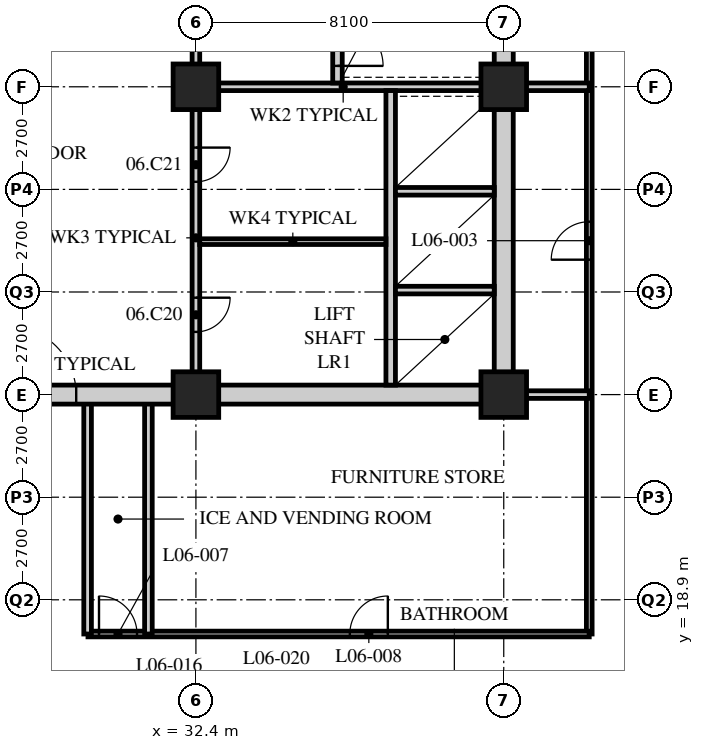
"""IFC4 building model, lengths in metres.
Left out: names, types, materials, properties, quantities, classifications, styles, units other than length and angle.
Written with IfcOpenShell. Run it as: python <this file> out.ifc"""

import sys

from ifc_helpers import new_model, si_unit, direction, frame, frame_2d, origin, origin_2d, place, context, subcontext, project, spatial, rectangle, hollow_rectangle, extrude, element, fill, save


model = new_model("IFC4")
c1 = context("Model", 3, precision=1e-05, world=origin(), true_north=direction((0.0, 1.0)))
c2 = subcontext(c1, "Body", "Model", "MODEL_VIEW")
j1 = project(units=[si_unit("LENGTHUNIT", "METRE"), si_unit("PLANEANGLEUNIT", "RADIAN")], contexts=[c1])
p1 = place(None, origin())
s1 = spatial("IfcSite", under=j1, at=p1, CompositionType="ELEMENT")
p2 = place(p1, origin())
s2 = spatial("IfcBuilding", under=s1, at=p2, CompositionType="ELEMENT")
p3 = place(p2, frame((0.0, 0.0, 33.0)))
s3 = spatial("IfcBuildingStorey", under=s2, at=p3, CompositionType="ELEMENT", Elevation=33.0)
for number, where, z_axis, x_axis in (
    (1, (32.4, 24.3, 0.0), (0.0, 0.0, 1.0), (1.0, 0.0, 0.0)),
    (2, (32.4, 32.4, 0.0), (0.0, 0.0, 1.0), (1.0, 0.0, 0.0)),
    (3, (40.5, 24.3, 0.0), (0.0, 0.0, 1.0), (1.0, 0.0, 0.0)),
    (4, (40.5, 32.4, 0.0), (0.0, 0.0, 1.0), (1.0, 0.0, 0.0)),
):
    element("IfcColumn", number, at=place(p3, frame(where, z_axis=z_axis, x_axis=x_axis)), inside=s3, PredefinedType="COLUMN", context=c2, shape_type="SweptSolid", body=[
        extrude(hollow_rectangle(XDim=1.2, YDim=1.2, WallThickness=0.12, at=origin_2d()), origin(), (0.0, 0.0, 1.0), 3.4),
    ])
p4 = place(p3, frame((42.75, 18.0, 0.0), z_axis=(0.0, 0.0, 1.0), x_axis=(0.0, 1.0, 0.0)))
e5 = element("IfcWall", 5, at=p4, inside=s3, PredefinedType="PARTITIONING", context=c2, shape_type="SweptSolid", body=[
    extrude(rectangle(XDim=22.5, YDim=0.15, at=frame_2d((11.25, 0.0))), origin(), (0.0, 0.0, 1.0), 3.19),
])
p5 = place(p4, frame((9.85, 0.0, 0.0)))
e6 = element("IfcOpeningElement", 6, at=p5, cuts=e5, PredefinedType="OPENING", context=c2, shape_type="SweptSolid", body=[
    extrude(rectangle(XDim=1.0, YDim=2.1, at=frame_2d((0.5, 1.05))), frame((0.0, 0.085, 0.0), z_axis=(0.0, -1.0, 0.0), x_axis=(1.0, 0.0, 0.0)), (0.0, 0.0, 1.0), 0.17),
])
p6 = place(p4, frame((17.95, 0.0, 0.0)))
e7 = element("IfcOpeningElement", 7, at=p6, cuts=e5, PredefinedType="OPENING", context=c2, shape_type="SweptSolid", body=[
    extrude(rectangle(XDim=1.0, YDim=2.1, at=frame_2d((0.5, 1.05))), frame((0.0, 0.085, 0.0), z_axis=(0.0, -1.0, 0.0), x_axis=(1.0, 0.0, 0.0)), (0.0, 0.0, 1.0), 0.17),
])
p7 = place(p3, frame((29.56, 18.0, 0.0), z_axis=(0.0, 0.0, 1.0), x_axis=(1.0, 0.0, 0.0)))
e8 = element("IfcWall", 8, at=p7, inside=s3, PredefinedType="PARTITIONING", context=c2, shape_type="SweptSolid", body=[
    extrude(rectangle(XDim=13.19, YDim=0.15, at=frame_2d((6.595, 0.0))), origin(), (0.0, 0.0, 1.0), 3.19),
])
p8 = place(p7, frame((0.29, 0.0, 0.0)))
e9 = element("IfcOpeningElement", 9, at=p8, cuts=e8, PredefinedType="OPENING", context=c2, shape_type="SweptSolid", body=[
    extrude(rectangle(XDim=1.0, YDim=2.1, at=frame_2d((0.5, 1.05))), frame((0.0, 0.085, 0.0), z_axis=(0.0, -1.0, 0.0), x_axis=(1.0, 0.0, 0.0)), (0.0, 0.0, 1.0), 0.17),
])
p9 = place(p7, frame((6.89, 0.0, 0.0)))
e10 = element("IfcOpeningElement", 10, at=p9, cuts=e8, PredefinedType="OPENING", context=c2, shape_type="SweptSolid", body=[
    extrude(rectangle(XDim=1.0, YDim=2.1, at=frame_2d((0.5, 1.05))), frame((0.0, 0.085, 0.0), z_axis=(0.0, -1.0, 0.0), x_axis=(1.0, 0.0, 0.0)), (0.0, 0.0, 1.0), 0.17),
])
p10 = place(p3, frame((40.5, 32.4, 0.0), z_axis=(0.0, 0.0, 1.0), x_axis=(1.0, 0.0, 0.0)))
e11 = element("IfcWall", 11, at=p10, inside=s3, PredefinedType="SOLIDWALL", context=c2, shape_type="SweptSolid", body=[
    extrude(rectangle(XDim=2.25, YDim=0.2, at=frame_2d((1.125, 0.0))), origin(), (0.0, 0.0, 1.0), 2.578),
])
for number, where, z_axis, x_axis in (
    (12, (31.15, 18.0, 0.0), (0.0, 0.0, 1.0), (0.0, 1.0, 0.0)),
    (13, (29.55, 18.0, 0.0), (0.0, 0.0, 1.0), (0.0, 1.0, 0.0)),
):
    element("IfcWall", number, at=place(p3, frame(where, z_axis=z_axis, x_axis=x_axis)), inside=s3, PredefinedType="SOLIDWALL", context=c2, shape_type="SweptSolid", body=[
        extrude(rectangle(XDim=6.3, YDim=0.2, at=frame_2d((3.15, 0.0))), origin(), (0.0, 0.0, 1.0), 3.19),
    ])
p11 = place(p3, frame((40.5, 24.3, 0.0), z_axis=(0.0, 0.0, 1.0), x_axis=(1.0, 0.0, 0.0)))
e14 = element("IfcWall", 14, at=p11, inside=s3, PredefinedType="SOLIDWALL", context=c2, shape_type="SweptSolid", body=[
    extrude(rectangle(XDim=2.25, YDim=0.2, at=frame_2d((1.125, 0.0))), origin(), (0.0, 0.0, 1.0), 2.578),
])
p12 = place(p3, frame((15.95, 24.3, 0.0), z_axis=(0.0, 0.0, 1.0), x_axis=(1.0, 0.0, 0.0)))
e15 = element("IfcWall", 15, at=p12, inside=s3, PredefinedType="SOLIDWALL", context=c2, shape_type="SweptSolid", body=[
    extrude(rectangle(XDim=24.8, YDim=0.5, at=frame_2d((12.4, 0.0))), origin(), (0.0, 0.0, 1.0), 2.54),
])
p13 = place(p12, frame((11.5, 0.0, 0.0)))
e16 = element("IfcOpeningElement", 16, at=p13, cuts=e15, PredefinedType="OPENING", context=c2, shape_type="SweptSolid", body=[
    extrude(rectangle(XDim=1.8, YDim=2.4, at=frame_2d((0.9, 1.2))), frame((0.0, 0.26, 0.0), z_axis=(0.0, -1.0, 0.0), x_axis=(1.0, 0.0, 0.0)), (0.0, 0.0, 1.0), 0.52),
])
p14 = place(p3, frame((40.5, 24.55, 0.0), z_axis=(0.0, 0.0, 1.0), x_axis=(0.0, 1.0, 0.0)))
e17 = element("IfcWall", 17, at=p14, inside=s3, PredefinedType="SOLIDWALL", context=c2, shape_type="SweptSolid", body=[
    extrude(rectangle(XDim=15.7, YDim=0.5, at=frame_2d((7.85, 0.0))), origin(), (0.0, 0.0, 1.0), 2.578),
])
p15 = place(p3, frame((32.3, 32.4, 0.0), z_axis=(0.0, 0.0, 1.0), x_axis=(1.0, 0.0, 0.0)))
e18 = element("IfcWall", 18, at=p15, inside=s3, PredefinedType="SOLIDWALL", context=c2, shape_type="SweptSolid", body=[
    extrude(rectangle(XDim=7.95, YDim=0.2, at=frame_2d((3.975, 0.0))), origin(), (0.0, 0.0, 1.0), 2.578),
])
p16 = place(p3, frame((32.4, 32.5, 0.0), z_axis=(0.0, 0.0, 1.0), x_axis=(0.0, 1.0, 0.0)))
e19 = element("IfcWall", 19, at=p16, inside=s3, PredefinedType="SOLIDWALL", context=c2, shape_type="SweptSolid", body=[
    extrude(rectangle(XDim=7.75, YDim=0.2, at=frame_2d((3.875, 0.0))), origin(), (0.0, 0.0, 1.0), 2.578),
])
p17 = place(p16, frame((1.9, 0.0, 0.0)))
e20 = element("IfcOpeningElement", 20, at=p17, cuts=e19, PredefinedType="OPENING", context=c2, shape_type="SweptSolid", body=[
    extrude(rectangle(XDim=1.2, YDim=2.1, at=frame_2d((0.6, 1.05))), frame((0.0, 0.11, 0.0), z_axis=(0.0, -1.0, 0.0), x_axis=(1.0, 0.0, 0.0)), (0.0, 0.0, 1.0), 0.22),
])
p18 = place(p3, frame((37.525, 24.55, 0.0), z_axis=(0.0, 0.0, 1.0), x_axis=(0.0, 1.0, 0.0)))
e21 = element("IfcWall", 21, at=p18, inside=s3, PredefinedType="SOLIDWALL", context=c2, shape_type="SweptSolid", body=[
    extrude(rectangle(XDim=7.75, YDim=0.25, at=frame_2d((3.875, 0.0))), origin(), (0.0, 0.0, 1.0), 3.19),
])
for number, where, z_axis, x_axis in (
    (22, (37.65, 27.05, 0.0), (0.0, 0.0, 1.0), (1.0, 0.0, 0.0)),
    (23, (37.65, 29.65, 0.0), (0.0, 0.0, 1.0), (1.0, 0.0, 0.0)),
):
    element("IfcWall", number, at=place(p3, frame(where, z_axis=z_axis, x_axis=x_axis)), inside=s3, PredefinedType="SOLIDWALL", context=c2, shape_type="SweptSolid", body=[
        extrude(rectangle(XDim=2.6, YDim=0.2, at=frame_2d((1.3, 0.0))), origin(), (0.0, 0.0, 1.0), 3.19),
    ])
p19 = place(p3, frame((36.125, 32.5, 0.0), z_axis=(0.0, 0.0, 1.0), x_axis=(0.0, 1.0, 0.0)))
e24 = element("IfcWall", 24, at=p19, inside=s3, PredefinedType="SOLIDWALL", context=c2, shape_type="SweptSolid", body=[
    extrude(rectangle(XDim=7.75, YDim=0.25, at=frame_2d((3.875, 0.0))), origin(), (0.0, 0.0, 1.0), 3.19),
])
p20 = place(p19, frame((0.45, 0.0, 0.0)))
e25 = element("IfcOpeningElement", 25, at=p20, cuts=e24, PredefinedType="OPENING", context=c2, shape_type="SweptSolid", body=[
    extrude(rectangle(XDim=1.2, YDim=2.1, at=frame_2d((0.6, 1.05))), frame((0.0, 0.135, 0.0), z_axis=(0.0, -1.0, 0.0), x_axis=(1.0, 0.0, 0.0)), (0.0, 0.0, 1.0), 0.27),
])
p21 = place(p3, frame((32.4, 24.55, 0.0), z_axis=(0.0, 0.0, 1.0), x_axis=(0.0, 1.0, 0.0)))
e26 = element("IfcWall", 26, at=p21, inside=s3, PredefinedType="PARTITIONING", context=c2, shape_type="SweptSolid", body=[
    extrude(rectangle(XDim=7.75, YDim=0.2, at=frame_2d((3.875, 0.0))), origin(), (0.0, 0.0, 1.0), 2.578),
])
p22 = place(p21, frame((1.4, 0.0, 0.0)))
e27 = element("IfcOpeningElement", 27, at=p22, cuts=e26, PredefinedType="OPENING", context=c2, shape_type="SweptSolid", body=[
    extrude(rectangle(XDim=0.9, YDim=2.1, at=frame_2d((0.45, 1.05))), frame((0.0, 0.11, 0.0), z_axis=(0.0, -1.0, 0.0), x_axis=(1.0, 0.0, 0.0)), (0.0, 0.0, 1.0), 0.22),
])
p23 = place(p21, frame((5.35, 0.0, 0.0)))
e28 = element("IfcOpeningElement", 28, at=p23, cuts=e26, PredefinedType="OPENING", context=c2, shape_type="SweptSolid", body=[
    extrude(rectangle(XDim=0.9, YDim=2.1, at=frame_2d((0.45, 1.05))), frame((0.0, 0.11, 0.0), z_axis=(0.0, -1.0, 0.0), x_axis=(1.0, 0.0, 0.0)), (0.0, 0.0, 1.0), 0.22),
])
p24 = place(p3, frame((32.5, 28.325, 0.0), z_axis=(0.0, 0.0, 1.0), x_axis=(1.0, 0.0, 0.0)))
e29 = element("IfcWall", 29, at=p24, inside=s3, PredefinedType="PARTITIONING", context=c2, shape_type="SweptSolid", body=[
    extrude(rectangle(XDim=4.9, YDim=0.15, at=frame_2d((2.45, 0.0))), origin(), (0.0, 0.0, 1.0), 3.19),
])
p25 = place(p5, origin())
e30 = element("IfcDoor", 30, at=p25, inside=s3, OperationType="SINGLE_SWING_LEFT", PredefinedType="DOOR", context=c2, shape_type="SweptSolid", body=[
    extrude(rectangle(XDim=1.0, YDim=2.1, at=frame_2d((0.5, 1.05))), frame((0.0, 0.025, 0.0), z_axis=(0.0, -1.0, 0.0), x_axis=(1.0, 0.0, 0.0)), (0.0, 0.0, 1.0), 0.05),
])
fill(e6, e30)
p26 = place(p8, origin())
e31 = element("IfcDoor", 31, at=p26, inside=s3, OperationType="SINGLE_SWING_LEFT", PredefinedType="DOOR", context=c2, shape_type="SweptSolid", body=[
    extrude(rectangle(XDim=1.0, YDim=2.1, at=frame_2d((0.5, 1.05))), frame((0.0, 0.025, 0.0), z_axis=(0.0, -1.0, 0.0), x_axis=(1.0, 0.0, 0.0)), (0.0, 0.0, 1.0), 0.05),
])
fill(e9, e31)
p27 = place(p9, origin())
e32 = element("IfcDoor", 32, at=p27, inside=s3, OperationType="SINGLE_SWING_RIGHT", PredefinedType="DOOR", context=c2, shape_type="SweptSolid", body=[
    extrude(rectangle(XDim=1.0, YDim=2.1, at=frame_2d((0.5, 1.05))), frame((0.0, 0.025, 0.0), z_axis=(0.0, -1.0, 0.0), x_axis=(1.0, 0.0, 0.0)), (0.0, 0.0, 1.0), 0.05),
])
fill(e10, e32)
p28 = place(p22, origin())
e33 = element("IfcDoor", 33, at=p28, inside=s3, OperationType="SINGLE_SWING_LEFT", PredefinedType="DOOR", context=c2, shape_type="SweptSolid", body=[
    extrude(rectangle(XDim=0.9, YDim=2.1, at=frame_2d((0.45, 1.05))), frame((0.0, 0.025, 0.0), z_axis=(0.0, -1.0, 0.0), x_axis=(1.0, 0.0, 0.0)), (0.0, 0.0, 1.0), 0.05),
])
fill(e27, e33)
p29 = place(p23, origin())
e34 = element("IfcDoor", 34, at=p29, inside=s3, OperationType="SINGLE_SWING_LEFT", PredefinedType="DOOR", context=c2, shape_type="SweptSolid", body=[
    extrude(rectangle(XDim=0.9, YDim=2.1, at=frame_2d((0.45, 1.05))), frame((0.0, 0.025, 0.0), z_axis=(0.0, -1.0, 0.0), x_axis=(1.0, 0.0, 0.0)), (0.0, 0.0, 1.0), 0.05),
])
fill(e28, e34)
p30 = place(p20, origin())
e35 = element("IfcDoor", 35, at=p30, inside=s3, OperationType="SINGLE_SWING_RIGHT", PredefinedType="DOOR", context=c2, shape_type="SweptSolid", body=[
    extrude(rectangle(XDim=1.2, YDim=2.1, at=frame_2d((0.6, 1.05))), frame((0.0, 0.025, 0.0), z_axis=(0.0, -1.0, 0.0), x_axis=(1.0, 0.0, 0.0)), (0.0, 0.0, 1.0), 0.05),
])
fill(e25, e35)
p31 = place(p13, origin())
e36 = element("IfcDoor", 36, at=p31, inside=s3, OperationType="DOUBLE_DOOR_SINGLE_SWING", PredefinedType="DOOR", context=c2, shape_type="SweptSolid", body=[
    extrude(rectangle(XDim=1.8, YDim=2.4, at=frame_2d((0.9, 1.2))), frame((0.0, 0.025, 0.0), z_axis=(0.0, -1.0, 0.0), x_axis=(1.0, 0.0, 0.0)), (0.0, 0.0, 1.0), 0.05),
])
fill(e16, e36)
save(model, sys.argv[1])
